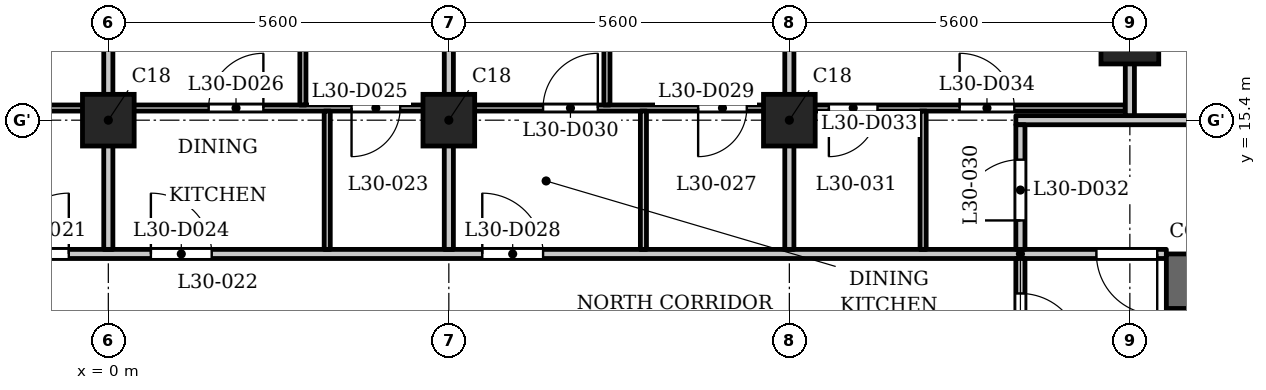
"""IFC4 building model, lengths in metres.
Left out: names, types, materials, properties, quantities, classifications, styles, units other than length and angle.
Written with IfcOpenShell. Run it as: python <this file> out.ifc"""

import sys

from ifc_helpers import new_model, si_unit, direction, frame, frame_2d, origin, origin_2d, place, context, subcontext, project, spatial, rectangle, extrude, element, fill, save


model = new_model("IFC4")
c1 = context("Model", 3, precision=1e-05, world=origin(), true_north=direction((0.0, 1.0)))
c2 = subcontext(c1, "Body", "Model", "MODEL_VIEW")
j1 = project(units=[si_unit("LENGTHUNIT", "METRE"), si_unit("PLANEANGLEUNIT", "RADIAN")], contexts=[c1])
p1 = place(None, origin())
s1 = spatial("IfcSite", under=j1, at=p1, CompositionType="ELEMENT")
p2 = place(p1, origin())
s2 = spatial("IfcBuilding", under=s1, at=p2, CompositionType="ELEMENT")
p3 = place(p2, frame((0.0, 0.0, 118.3)))
s3 = spatial("IfcBuildingStorey", under=s2, at=p3, CompositionType="ELEMENT", Elevation=118.3)
p4 = place(p3, frame((16.8, 16.8, 0.0), z_axis=(0.0, 0.0, 1.0), x_axis=(1.0, 0.0, 0.0)))
e1 = element("IfcColumn", 1, at=p4, inside=s3, PredefinedType="COLUMN", context=c2, shape_type="SweptSolid", body=[
    extrude(rectangle(XDim=0.95, YDim=0.95, at=origin_2d()), origin(), (0.0, 0.0, 1.0), 3.5),
])
for number, where, z_axis, x_axis in (
    (2, (0.0, 15.4, 0.0), (0.0, 0.0, 1.0), (1.0, 0.0, 0.0)),
    (3, (5.6, 15.4, 0.0), (0.0, 0.0, 1.0), (1.0, 0.0, 0.0)),
    (4, (11.2, 15.4, 0.0), (0.0, 0.0, 1.0), (1.0, 0.0, 0.0)),
):
    element("IfcColumn", number, at=place(p3, frame(where, z_axis=z_axis, x_axis=x_axis)), inside=s3, PredefinedType="COLUMN", context=c2, shape_type="SweptSolid", body=[
        extrude(rectangle(XDim=0.85, YDim=0.85, at=origin_2d()), origin(), (0.0, 0.0, 1.0), 3.5),
    ])
p5 = place(p3, frame((17.4, 12.75, 0.0), z_axis=(0.0, 0.0, 1.0), x_axis=(1.0, 0.0, 0.0)))
e5 = element("IfcWall", 5, at=p5, inside=s3, PredefinedType="SHEAR", context=c2, shape_type="SweptSolid", body=[
    extrude(rectangle(XDim=10.4, YDim=0.9, at=frame_2d((5.2, 0.0))), origin(), (0.0, 0.0, 1.0), 3.2),
])
p6 = place(p3, frame((17.6, -12.3, 0.0), z_axis=(0.0, 0.0, 1.0), x_axis=(0.0, 1.0, 0.0)))
e6 = element("IfcWall", 6, at=p6, inside=s3, PredefinedType="SHEAR", context=c2, shape_type="SweptSolid", body=[
    extrude(rectangle(XDim=24.6, YDim=0.4, at=frame_2d((12.3, 0.0))), origin(), (0.0, 0.0, 1.0), 3.2),
])
p7 = place(p6, frame((6.0, 0.0, 0.0)))
e7 = element("IfcOpeningElement", 7, at=p7, cuts=e6, PredefinedType="OPENING", context=c2, shape_type="SweptSolid", body=[
    extrude(rectangle(XDim=1.1, YDim=2.1, at=frame_2d((0.55, 1.05))), frame((0.0, 0.21, 0.0), z_axis=(0.0, -1.0, 0.0), x_axis=(1.0, 0.0, 0.0)), (0.0, 0.0, 1.0), 0.42),
])
p8 = place(p6, frame((8.4, 0.0, 0.0)))
e8 = element("IfcOpeningElement", 8, at=p8, cuts=e6, PredefinedType="OPENING", context=c2, shape_type="SweptSolid", body=[
    extrude(rectangle(XDim=1.1, YDim=2.1, at=frame_2d((0.55, 1.05))), frame((0.0, 0.21, 0.0), z_axis=(0.0, -1.0, 0.0), x_axis=(1.0, 0.0, 0.0)), (0.0, 0.0, 1.0), 0.42),
])
p9 = place(p6, frame((10.8, 0.0, 0.0)))
e9 = element("IfcOpeningElement", 9, at=p9, cuts=e6, PredefinedType="OPENING", context=c2, shape_type="SweptSolid", body=[
    extrude(rectangle(XDim=1.1, YDim=2.1, at=frame_2d((0.55, 1.05))), frame((0.0, 0.21, 0.0), z_axis=(0.0, -1.0, 0.0), x_axis=(1.0, 0.0, 0.0)), (0.0, 0.0, 1.0), 0.42),
])
p10 = place(p6, frame((16.75, 0.0, 0.0)))
e10 = element("IfcOpeningElement", 10, at=p10, cuts=e6, PredefinedType="OPENING", context=c2, shape_type="SweptSolid", body=[
    extrude(rectangle(XDim=0.9, YDim=2.1, at=frame_2d((0.45, 1.05))), frame((0.0, 0.21, 0.0), z_axis=(0.0, -1.0, 0.0), x_axis=(1.0, 0.0, 0.0)), (0.0, 0.0, 1.0), 0.42),
])
p11 = place(p6, frame((22.8, 0.0, 0.0)))
e11 = element("IfcOpeningElement", 11, at=p11, cuts=e6, PredefinedType="OPENING", context=c2, shape_type="SweptSolid", body=[
    extrude(rectangle(XDim=1.1, YDim=2.1, at=frame_2d((0.55, 1.05))), frame((0.0, 0.21, 0.0), z_axis=(0.0, -1.0, 0.0), x_axis=(1.0, 0.0, 0.0)), (0.0, 0.0, 1.0), 0.42),
])
p12 = place(p6, frame((0.7, 0.0, 0.0)))
e12 = element("IfcOpeningElement", 12, at=p12, cuts=e6, PredefinedType="OPENING", context=c2, shape_type="SweptSolid", body=[
    extrude(rectangle(XDim=1.1, YDim=2.1, at=frame_2d((0.55, 1.05))), frame((0.0, 0.21, 0.0), z_axis=(0.0, -1.0, 0.0), x_axis=(1.0, 0.0, 0.0)), (0.0, 0.0, 1.0), 0.42),
])
p13 = place(p6, frame((12.775, 0.0, 0.0)))
e13 = element("IfcOpeningElement", 13, at=p13, cuts=e6, PredefinedType="OPENING", context=c2, shape_type="SweptSolid", body=[
    extrude(rectangle(XDim=1.8, YDim=2.1, at=frame_2d((0.9, 1.05))), frame((0.0, 0.21, 0.0), z_axis=(0.0, -1.0, 0.0), x_axis=(1.0, 0.0, 0.0)), (0.0, 0.0, 1.0), 0.42),
])
p14 = place(p3, frame((-17.4, 13.2, 0.0), z_axis=(0.0, 0.0, 1.0), x_axis=(1.0, 0.0, 0.0)))
e14 = element("IfcWall", 14, at=p14, inside=s3, PredefinedType="PARTITIONING", context=c2, shape_type="SweptSolid", body=[
    extrude(rectangle(XDim=34.8, YDim=0.15, at=frame_2d((17.4, 0.0))), origin(), (0.0, 0.0, 1.0), 3.2),
])
p15 = place(p14, frame((0.25, 0.0, 0.0)))
e15 = element("IfcOpeningElement", 15, at=p15, cuts=e14, PredefinedType="OPENING", context=c2, shape_type="SweptSolid", body=[
    extrude(rectangle(XDim=1.0, YDim=2.1, at=frame_2d((0.5, 1.05))), frame((0.0, 0.085, 0.0), z_axis=(0.0, -1.0, 0.0), x_axis=(1.0, 0.0, 0.0)), (0.0, 0.0, 1.0), 0.17),
])
p16 = place(p14, frame((33.65, 0.0, 0.0)))
e16 = element("IfcOpeningElement", 16, at=p16, cuts=e14, PredefinedType="OPENING", context=c2, shape_type="SweptSolid", body=[
    extrude(rectangle(XDim=1.0, YDim=2.1, at=frame_2d((0.5, 1.05))), frame((0.0, 0.085, 0.0), z_axis=(0.0, -1.0, 0.0), x_axis=(1.0, 0.0, 0.0)), (0.0, 0.0, 1.0), 0.17),
])
p17 = place(p14, frame((15.75, 0.0, 0.0)))
e17 = element("IfcOpeningElement", 17, at=p17, cuts=e14, PredefinedType="OPENING", context=c2, shape_type="SweptSolid", body=[
    extrude(rectangle(XDim=1.0, YDim=2.1, at=frame_2d((0.5, 1.05))), frame((0.0, 0.085, 0.0), z_axis=(0.0, -1.0, 0.0), x_axis=(1.0, 0.0, 0.0)), (0.0, 0.0, 1.0), 0.17),
])
p18 = place(p14, frame((18.1, 0.0, 0.0)))
e18 = element("IfcOpeningElement", 18, at=p18, cuts=e14, PredefinedType="OPENING", context=c2, shape_type="SweptSolid", body=[
    extrude(rectangle(XDim=1.0, YDim=2.1, at=frame_2d((0.5, 1.05))), frame((0.0, 0.085, 0.0), z_axis=(0.0, -1.0, 0.0), x_axis=(1.0, 0.0, 0.0)), (0.0, 0.0, 1.0), 0.17),
])
p19 = place(p14, frame((23.55, 0.0, 0.0)))
e19 = element("IfcOpeningElement", 19, at=p19, cuts=e14, PredefinedType="OPENING", context=c2, shape_type="SweptSolid", body=[
    extrude(rectangle(XDim=1.0, YDim=2.1, at=frame_2d((0.5, 1.05))), frame((0.0, 0.085, 0.0), z_axis=(0.0, -1.0, 0.0), x_axis=(1.0, 0.0, 0.0)), (0.0, 0.0, 1.0), 0.17),
])
p20 = place(p3, frame((14.925, 15.4, 0.0), z_axis=(0.0, 0.0, 1.0), x_axis=(1.0, 0.0, 0.0)))
e20 = element("IfcWall", 20, at=p20, inside=s3, PredefinedType="PARTITIONING", context=c2, shape_type="SweptSolid", body=[
    extrude(rectangle(XDim=12.559, YDim=0.15, at=frame_2d((6.279, 0.0))), origin(), (0.0, 0.0, 1.0), 3.2),
])
p21 = place(p20, frame((5.825, 0.0, 0.0)))
e21 = element("IfcOpeningElement", 21, at=p21, cuts=e20, PredefinedType="OPENING", context=c2, shape_type="SweptSolid", body=[
    extrude(rectangle(XDim=1.0, YDim=2.1, at=frame_2d((0.5, 1.05))), frame((0.0, 0.085, 0.0), z_axis=(0.0, -1.0, 0.0), x_axis=(1.0, 0.0, 0.0)), (0.0, 0.0, 1.0), 0.17),
])
p22 = place(p3, frame((-16.725, 15.6, 0.0), z_axis=(0.0, 0.0, 1.0), x_axis=(1.0, 0.0, 0.0)))
e22 = element("IfcWall", 22, at=p22, inside=s3, PredefinedType="PARTITIONING", context=c2, shape_type="SweptSolid", body=[
    extrude(rectangle(XDim=33.45, YDim=0.1, at=frame_2d((16.725, 0.0))), origin(), (0.0, 0.0, 1.0), 3.2),
])
p23 = place(p22, frame((9.425, 0.0, 0.0)))
e23 = element("IfcOpeningElement", 23, at=p23, cuts=e22, PredefinedType="OPENING", context=c2, shape_type="SweptSolid", body=[
    extrude(rectangle(XDim=0.8, YDim=2.1, at=frame_2d((0.4, 1.05))), frame((0.0, 0.06, 0.0), z_axis=(0.0, -1.0, 0.0), x_axis=(1.0, 0.0, 0.0)), (0.0, 0.0, 1.0), 0.12),
])
p24 = place(p22, frame((6.975, 0.0, 0.0)))
e24 = element("IfcOpeningElement", 24, at=p24, cuts=e22, PredefinedType="OPENING", context=c2, shape_type="SweptSolid", body=[
    extrude(rectangle(XDim=0.9, YDim=2.1, at=frame_2d((0.45, 1.05))), frame((0.0, 0.06, 0.0), z_axis=(0.0, -1.0, 0.0), x_axis=(1.0, 0.0, 0.0)), (0.0, 0.0, 1.0), 0.12),
])
p25 = place(p22, frame((1.875, 0.0, 0.0)))
e25 = element("IfcOpeningElement", 25, at=p25, cuts=e22, PredefinedType="OPENING", context=c2, shape_type="SweptSolid", body=[
    extrude(rectangle(XDim=0.9, YDim=2.1, at=frame_2d((0.45, 1.05))), frame((0.0, 0.06, 0.0), z_axis=(0.0, -1.0, 0.0), x_axis=(1.0, 0.0, 0.0)), (0.0, 0.0, 1.0), 0.12),
])
p26 = place(p22, frame((3.475, 0.0, 0.0)))
e26 = element("IfcOpeningElement", 26, at=p26, cuts=e22, PredefinedType="OPENING", context=c2, shape_type="SweptSolid", body=[
    extrude(rectangle(XDim=0.9, YDim=2.1, at=frame_2d((0.45, 1.05))), frame((0.0, 0.06, 0.0), z_axis=(0.0, -1.0, 0.0), x_axis=(1.0, 0.0, 0.0)), (0.0, 0.0, 1.0), 0.12),
])
p27 = place(p22, frame((11.775, 0.0, 0.0)))
e27 = element("IfcOpeningElement", 27, at=p27, cuts=e22, PredefinedType="OPENING", context=c2, shape_type="SweptSolid", body=[
    extrude(rectangle(XDim=0.8, YDim=2.1, at=frame_2d((0.4, 1.05))), frame((0.0, 0.06, 0.0), z_axis=(0.0, -1.0, 0.0), x_axis=(1.0, 0.0, 0.0)), (0.0, 0.0, 1.0), 0.12),
])
p28 = place(p22, frame((14.175, 0.0, 0.0)))
e28 = element("IfcOpeningElement", 28, at=p28, cuts=e22, PredefinedType="OPENING", context=c2, shape_type="SweptSolid", body=[
    extrude(rectangle(XDim=0.9, YDim=2.1, at=frame_2d((0.45, 1.05))), frame((0.0, 0.06, 0.0), z_axis=(0.0, -1.0, 0.0), x_axis=(1.0, 0.0, 0.0)), (0.0, 0.0, 1.0), 0.12),
])
p29 = place(p22, frame((20.725, 0.0, 0.0)))
e29 = element("IfcOpeningElement", 29, at=p29, cuts=e22, PredefinedType="OPENING", context=c2, shape_type="SweptSolid", body=[
    extrude(rectangle(XDim=0.8, YDim=2.1, at=frame_2d((0.4, 1.05))), frame((0.0, 0.06, 0.0), z_axis=(0.0, -1.0, 0.0), x_axis=(1.0, 0.0, 0.0)), (0.0, 0.0, 1.0), 0.12),
])
p30 = place(p22, frame((18.375, 0.0, 0.0)))
e30 = element("IfcOpeningElement", 30, at=p30, cuts=e22, PredefinedType="OPENING", context=c2, shape_type="SweptSolid", body=[
    extrude(rectangle(XDim=0.9, YDim=2.1, at=frame_2d((0.45, 1.05))), frame((0.0, 0.06, 0.0), z_axis=(0.0, -1.0, 0.0), x_axis=(1.0, 0.0, 0.0)), (0.0, 0.0, 1.0), 0.12),
])
p31 = place(p22, frame((26.425, 0.0, 0.0)))
e31 = element("IfcOpeningElement", 31, at=p31, cuts=e22, PredefinedType="OPENING", context=c2, shape_type="SweptSolid", body=[
    extrude(rectangle(XDim=0.8, YDim=2.1, at=frame_2d((0.4, 1.05))), frame((0.0, 0.06, 0.0), z_axis=(0.0, -1.0, 0.0), x_axis=(1.0, 0.0, 0.0)), (0.0, 0.0, 1.0), 0.12),
])
p32 = place(p22, frame((23.875, 0.0, 0.0)))
e32 = element("IfcOpeningElement", 32, at=p32, cuts=e22, PredefinedType="OPENING", context=c2, shape_type="SweptSolid", body=[
    extrude(rectangle(XDim=0.9, YDim=2.1, at=frame_2d((0.45, 1.05))), frame((0.0, 0.06, 0.0), z_axis=(0.0, -1.0, 0.0), x_axis=(1.0, 0.0, 0.0)), (0.0, 0.0, 1.0), 0.12),
])
p33 = place(p22, frame((28.575, 0.0, 0.0)))
e33 = element("IfcOpeningElement", 33, at=p33, cuts=e22, PredefinedType="OPENING", context=c2, shape_type="SweptSolid", body=[
    extrude(rectangle(XDim=0.8, YDim=2.1, at=frame_2d((0.4, 1.05))), frame((0.0, 0.06, 0.0), z_axis=(0.0, -1.0, 0.0), x_axis=(1.0, 0.0, 0.0)), (0.0, 0.0, 1.0), 0.12),
])
p34 = place(p22, frame((30.725, 0.0, 0.0)))
e34 = element("IfcOpeningElement", 34, at=p34, cuts=e22, PredefinedType="OPENING", context=c2, shape_type="SweptSolid", body=[
    extrude(rectangle(XDim=0.9, YDim=2.1, at=frame_2d((0.45, 1.05))), frame((0.0, 0.06, 0.0), z_axis=(0.0, -1.0, 0.0), x_axis=(1.0, 0.0, 0.0)), (0.0, 0.0, 1.0), 0.12),
])
p35 = place(p3, frame((0.0, 13.275, 0.0), z_axis=(0.0, 0.0, 1.0), x_axis=(0.0, 1.0, 0.0)))
e35 = element("IfcWall", 35, at=p35, inside=s3, PredefinedType="PARTITIONING", context=c2, shape_type="SweptSolid", body=[
    extrude(rectangle(XDim=2.275, YDim=0.15, at=frame_2d((1.138, 0.0))), origin(), (0.0, 0.0, 1.0), 3.2),
])
p36 = place(p3, frame((0.0, 15.65, 0.0), z_axis=(0.0, 0.0, 1.0), x_axis=(0.0, 1.0, 0.0)))
e36 = element("IfcWall", 36, at=p36, inside=s3, PredefinedType="PARTITIONING", context=c2, shape_type="SweptSolid", body=[
    extrude(rectangle(XDim=7.33, YDim=0.15, at=frame_2d((3.665, 0.0))), origin(), (0.0, 0.0, 1.0), 3.2),
])
p37 = place(p3, frame((3.2, 15.65, 0.0), z_axis=(0.0, 0.0, 1.0), x_axis=(0.0, 1.0, 0.0)))
e37 = element("IfcWall", 37, at=p37, inside=s3, PredefinedType="PARTITIONING", context=c2, shape_type="SweptSolid", body=[
    extrude(rectangle(XDim=6.43, YDim=0.1, at=frame_2d((3.215, 0.0))), origin(), (0.0, 0.0, 1.0), 3.2),
])
p38 = place(p37, frame((1.35, 0.0, 0.0)))
e38 = element("IfcOpeningElement", 38, at=p38, cuts=e37, PredefinedType="OPENING", context=c2, shape_type="SweptSolid", body=[
    extrude(rectangle(XDim=0.9, YDim=2.1, at=frame_2d((0.45, 1.05))), frame((0.0, 0.06, 0.0), z_axis=(0.0, -1.0, 0.0), x_axis=(1.0, 0.0, 0.0)), (0.0, 0.0, 1.0), 0.12),
])
p39 = place(p3, frame((3.6, 13.275, 0.0), z_axis=(0.0, 0.0, 1.0), x_axis=(0.0, 1.0, 0.0)))
e39 = element("IfcWall", 39, at=p39, inside=s3, PredefinedType="PARTITIONING", context=c2, shape_type="SweptSolid", body=[
    extrude(rectangle(XDim=2.275, YDim=0.1, at=frame_2d((1.138, 0.0))), origin(), (0.0, 0.0, 1.0), 3.2),
])
p40 = place(p3, frame((5.6, 13.275, 0.0), z_axis=(0.0, 0.0, 1.0), x_axis=(0.0, 1.0, 0.0)))
e40 = element("IfcWall", 40, at=p40, inside=s3, PredefinedType="PARTITIONING", context=c2, shape_type="SweptSolid", body=[
    extrude(rectangle(XDim=2.275, YDim=0.15, at=frame_2d((1.138, 0.0))), origin(), (0.0, 0.0, 1.0), 3.2),
])
p41 = place(p3, frame((5.6, 15.65, 0.0), z_axis=(0.0, 0.0, 1.0), x_axis=(0.0, 1.0, 0.0)))
e41 = element("IfcWall", 41, at=p41, inside=s3, PredefinedType="PARTITIONING", context=c2, shape_type="SweptSolid", body=[
    extrude(rectangle(XDim=7.33, YDim=0.15, at=frame_2d((3.665, 0.0))), origin(), (0.0, 0.0, 1.0), 3.2),
])
p42 = place(p3, frame((8.2, 15.65, 0.0), z_axis=(0.0, 0.0, 1.0), x_axis=(0.0, 1.0, 0.0)))
e42 = element("IfcWall", 42, at=p42, inside=s3, PredefinedType="PARTITIONING", context=c2, shape_type="SweptSolid", body=[
    extrude(rectangle(XDim=6.43, YDim=0.1, at=frame_2d((3.215, 0.0))), origin(), (0.0, 0.0, 1.0), 3.2),
])
p43 = place(p42, frame((1.35, 0.0, 0.0)))
e43 = element("IfcOpeningElement", 43, at=p43, cuts=e42, PredefinedType="OPENING", context=c2, shape_type="SweptSolid", body=[
    extrude(rectangle(XDim=0.9, YDim=2.1, at=frame_2d((0.45, 1.05))), frame((0.0, 0.06, 0.0), z_axis=(0.0, -1.0, 0.0), x_axis=(1.0, 0.0, 0.0)), (0.0, 0.0, 1.0), 0.12),
])
p44 = place(p3, frame((8.8, 13.275, 0.0), z_axis=(0.0, 0.0, 1.0), x_axis=(0.0, 1.0, 0.0)))
e44 = element("IfcWall", 44, at=p44, inside=s3, PredefinedType="PARTITIONING", context=c2, shape_type="SweptSolid", body=[
    extrude(rectangle(XDim=2.275, YDim=0.1, at=frame_2d((1.138, 0.0))), origin(), (0.0, 0.0, 1.0), 3.2),
])
p45 = place(p3, frame((11.2, 13.275, 0.0), z_axis=(0.0, 0.0, 1.0), x_axis=(0.0, 1.0, 0.0)))
e45 = element("IfcWall", 45, at=p45, inside=s3, PredefinedType="PARTITIONING", context=c2, shape_type="SweptSolid", body=[
    extrude(rectangle(XDim=2.275, YDim=0.15, at=frame_2d((1.138, 0.0))), origin(), (0.0, 0.0, 1.0), 3.2),
])
p46 = place(p3, frame((11.2, 15.65, 0.0), z_axis=(0.0, 0.0, 1.0), x_axis=(0.0, 1.0, 0.0)))
e46 = element("IfcWall", 46, at=p46, inside=s3, PredefinedType="PARTITIONING", context=c2, shape_type="SweptSolid", body=[
    extrude(rectangle(XDim=7.33, YDim=0.15, at=frame_2d((3.665, 0.0))), origin(), (0.0, 0.0, 1.0), 3.2),
])
p47 = place(p3, frame((13.4, 13.275, 0.0), z_axis=(0.0, 0.0, 1.0), x_axis=(0.0, 1.0, 0.0)))
e47 = element("IfcWall", 47, at=p47, inside=s3, PredefinedType="PARTITIONING", context=c2, shape_type="SweptSolid", body=[
    extrude(rectangle(XDim=2.275, YDim=0.1, at=frame_2d((1.138, 0.0))), origin(), (0.0, 0.0, 1.0), 3.2),
])
p48 = place(p3, frame((15.0, 6.769, 0.0), z_axis=(0.0, 0.0, 1.0), x_axis=(0.0, 1.0, 0.0)))
e48 = element("IfcWall", 48, at=p48, inside=s3, PredefinedType="PARTITIONING", context=c2, shape_type="SweptSolid", body=[
    extrude(rectangle(XDim=6.356, YDim=0.15, at=frame_2d((3.178, 0.0))), origin(), (0.0, 0.0, 1.0), 3.2),
])
p49 = place(p48, frame((4.781, 0.0, 0.0)))
e49 = element("IfcOpeningElement", 49, at=p49, cuts=e48, PredefinedType="OPENING", context=c2, shape_type="SweptSolid", body=[
    extrude(rectangle(XDim=1.0, YDim=2.1, at=frame_2d((0.5, 1.05))), frame((0.0, 0.085, 0.0), z_axis=(0.0, -1.0, 0.0), x_axis=(1.0, 0.0, 0.0)), (0.0, 0.0, 1.0), 0.17),
])
p50 = place(p3, frame((15.0, 13.275, 0.0), z_axis=(0.0, 0.0, 1.0), x_axis=(0.0, 1.0, 0.0)))
e50 = element("IfcWall", 50, at=p50, inside=s3, PredefinedType="PARTITIONING", context=c2, shape_type="SweptSolid", body=[
    extrude(rectangle(XDim=2.05, YDim=0.15, at=frame_2d((1.025, 0.0))), origin(), (0.0, 0.0, 1.0), 3.2),
])
p51 = place(p50, frame((0.476, 0.0, 0.0)))
e51 = element("IfcOpeningElement", 51, at=p51, cuts=e50, PredefinedType="OPENING", context=c2, shape_type="SweptSolid", body=[
    extrude(rectangle(XDim=1.0, YDim=2.1, at=frame_2d((0.5, 1.05))), frame((0.0, 0.085, 0.0), z_axis=(0.0, -1.0, 0.0), x_axis=(1.0, 0.0, 0.0)), (0.0, 0.0, 1.0), 0.17),
])
p52 = place(p3, frame((16.8, 15.475, 0.0), z_axis=(0.0, 0.0, 1.0), x_axis=(0.0, 1.0, 0.0)))
e52 = element("IfcWall", 52, at=p52, inside=s3, PredefinedType="PARTITIONING", context=c2, shape_type="SweptSolid", body=[
    extrude(rectangle(XDim=7.505, YDim=0.15, at=frame_2d((3.752, 0.0))), origin(), (0.0, 0.0, 1.0), 3.2),
])
p53 = place(p49, origin())
e53 = element("IfcDoor", 53, at=p53, inside=s3, OperationType="SINGLE_SWING_LEFT", PredefinedType="DOOR", context=c2, shape_type="SweptSolid", body=[
    extrude(rectangle(XDim=1.0, YDim=2.1, at=frame_2d((0.5, 1.05))), frame((0.0, 0.025, 0.0), z_axis=(0.0, -1.0, 0.0), x_axis=(1.0, 0.0, 0.0)), (0.0, 0.0, 1.0), 0.05),
])
fill(e49, e53)
p54 = place(p16, origin())
e54 = element("IfcDoor", 54, at=p54, inside=s3, OperationType="SINGLE_SWING_RIGHT", PredefinedType="DOOR", context=c2, shape_type="SweptSolid", body=[
    extrude(rectangle(XDim=1.0, YDim=2.1, at=frame_2d((0.5, 1.05))), frame((0.0, 0.025, 0.0), z_axis=(0.0, -1.0, 0.0), x_axis=(1.0, 0.0, 0.0)), (0.0, 0.0, 1.0), 0.05),
])
fill(e16, e54)
p55 = place(p17, origin())
e55 = element("IfcDoor", 55, at=p55, inside=s3, OperationType="SINGLE_SWING_LEFT", PredefinedType="DOOR", context=c2, shape_type="SweptSolid", body=[
    extrude(rectangle(XDim=1.0, YDim=2.1, at=frame_2d((0.5, 1.05))), frame((0.0, 0.025, 0.0), z_axis=(0.0, -1.0, 0.0), x_axis=(1.0, 0.0, 0.0)), (0.0, 0.0, 1.0), 0.05),
])
fill(e17, e55)
p56 = place(p18, origin())
e56 = element("IfcDoor", 56, at=p56, inside=s3, OperationType="SINGLE_SWING_RIGHT", PredefinedType="DOOR", context=c2, shape_type="SweptSolid", body=[
    extrude(rectangle(XDim=1.0, YDim=2.1, at=frame_2d((0.5, 1.05))), frame((0.0, 0.025, 0.0), z_axis=(0.0, -1.0, 0.0), x_axis=(1.0, 0.0, 0.0)), (0.0, 0.0, 1.0), 0.05),
])
fill(e18, e56)
p57 = place(p29, origin())
e57 = element("IfcDoor", 57, at=p57, inside=s3, OperationType="SINGLE_SWING_LEFT", PredefinedType="DOOR", context=c2, shape_type="SweptSolid", body=[
    extrude(rectangle(XDim=0.8, YDim=2.1, at=frame_2d((0.4, 1.05))), frame((0.0, 0.025, 0.0), z_axis=(0.0, -1.0, 0.0), x_axis=(1.0, 0.0, 0.0)), (0.0, 0.0, 1.0), 0.05),
])
fill(e29, e57)
p58 = place(p30, origin())
e58 = element("IfcDoor", 58, at=p58, inside=s3, OperationType="SINGLE_SWING_LEFT", PredefinedType="DOOR", context=c2, shape_type="SweptSolid", body=[
    extrude(rectangle(XDim=0.9, YDim=2.1, at=frame_2d((0.45, 1.05))), frame((0.0, 0.025, 0.0), z_axis=(0.0, -1.0, 0.0), x_axis=(1.0, 0.0, 0.0)), (0.0, 0.0, 1.0), 0.05),
])
fill(e30, e58)
p59 = place(p19, origin())
e59 = element("IfcDoor", 59, at=p59, inside=s3, OperationType="SINGLE_SWING_RIGHT", PredefinedType="DOOR", context=c2, shape_type="SweptSolid", body=[
    extrude(rectangle(XDim=1.0, YDim=2.1, at=frame_2d((0.5, 1.05))), frame((0.0, 0.025, 0.0), z_axis=(0.0, -1.0, 0.0), x_axis=(1.0, 0.0, 0.0)), (0.0, 0.0, 1.0), 0.05),
])
fill(e19, e59)
p60 = place(p31, origin())
e60 = element("IfcDoor", 60, at=p60, inside=s3, OperationType="SINGLE_SWING_LEFT", PredefinedType="DOOR", context=c2, shape_type="SweptSolid", body=[
    extrude(rectangle(XDim=0.8, YDim=2.1, at=frame_2d((0.4, 1.05))), frame((0.0, 0.025, 0.0), z_axis=(0.0, -1.0, 0.0), x_axis=(1.0, 0.0, 0.0)), (0.0, 0.0, 1.0), 0.05),
])
fill(e31, e60)
p61 = place(p32, origin())
e61 = element("IfcDoor", 61, at=p61, inside=s3, OperationType="SINGLE_SWING_LEFT", PredefinedType="DOOR", context=c2, shape_type="SweptSolid", body=[
    extrude(rectangle(XDim=0.9, YDim=2.1, at=frame_2d((0.45, 1.05))), frame((0.0, 0.025, 0.0), z_axis=(0.0, -1.0, 0.0), x_axis=(1.0, 0.0, 0.0)), (0.0, 0.0, 1.0), 0.05),
])
fill(e32, e61)
p62 = place(p51, origin())
e62 = element("IfcDoor", 62, at=p62, inside=s3, OperationType="SINGLE_SWING_RIGHT", PredefinedType="DOOR", context=c2, shape_type="SweptSolid", body=[
    extrude(rectangle(XDim=1.0, YDim=2.1, at=frame_2d((0.5, 1.05))), frame((0.0, 0.025, 0.0), z_axis=(0.0, -1.0, 0.0), x_axis=(1.0, 0.0, 0.0)), (0.0, 0.0, 1.0), 0.05),
])
fill(e51, e62)
p63 = place(p33, origin())
e63 = element("IfcDoor", 63, at=p63, inside=s3, OperationType="SINGLE_SWING_LEFT", PredefinedType="DOOR", context=c2, shape_type="SweptSolid", body=[
    extrude(rectangle(XDim=0.8, YDim=2.1, at=frame_2d((0.4, 1.05))), frame((0.0, 0.025, 0.0), z_axis=(0.0, -1.0, 0.0), x_axis=(1.0, 0.0, 0.0)), (0.0, 0.0, 1.0), 0.05),
])
fill(e33, e63)
p64 = place(p34, origin())
e64 = element("IfcDoor", 64, at=p64, inside=s3, OperationType="SINGLE_SWING_RIGHT", PredefinedType="DOOR", context=c2, shape_type="SweptSolid", body=[
    extrude(rectangle(XDim=0.9, YDim=2.1, at=frame_2d((0.45, 1.05))), frame((0.0, 0.025, 0.0), z_axis=(0.0, -1.0, 0.0), x_axis=(1.0, 0.0, 0.0)), (0.0, 0.0, 1.0), 0.05),
])
fill(e34, e64)
save(model, sys.argv[1])
